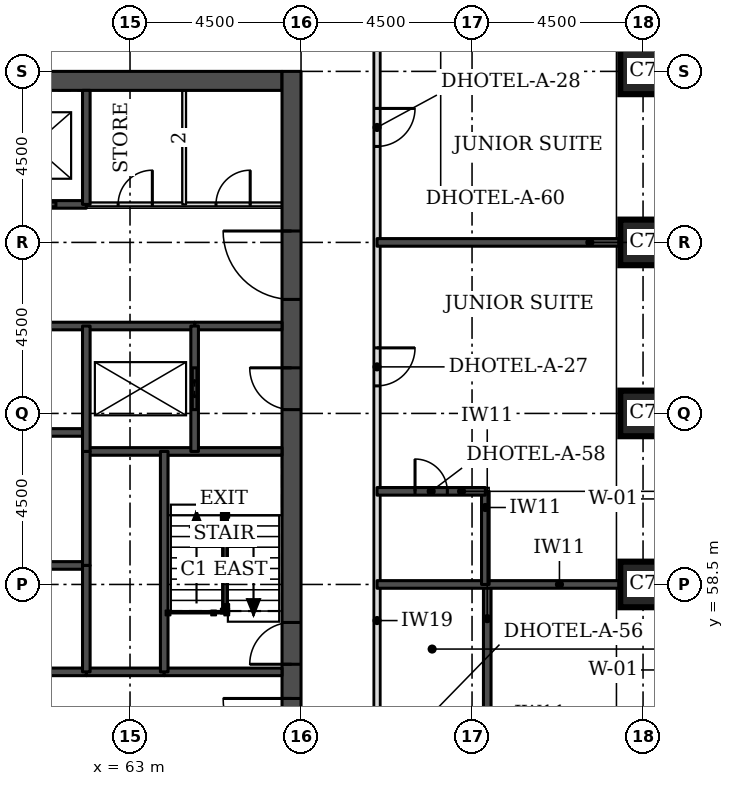
"""IFC4 building model, lengths in metres.
Left out: names, types, materials, properties, quantities, classifications, styles, units other than length and angle.
Written with IfcOpenShell. Run it as: python <this file> out.ifc"""

import sys

from ifc_helpers import new_model, si_unit, direction, frame, frame_2d, origin, origin_2d, place, context, subcontext, project, spatial, rectangle, extrude, element, fill, save


model = new_model("IFC4")
c1 = context("Model", 3, precision=1e-05, world=origin(), true_north=direction((0.0, 1.0)))
c2 = subcontext(c1, "Body", "Model", "MODEL_VIEW")
j1 = project(units=[si_unit("LENGTHUNIT", "METRE"), si_unit("PLANEANGLEUNIT", "RADIAN")], contexts=[c1])
p1 = place(None, origin())
s1 = spatial("IfcSite", under=j1, at=p1, CompositionType="ELEMENT")
p2 = place(p1, origin())
s2 = spatial("IfcBuilding", under=s1, at=p2, CompositionType="ELEMENT")
p3 = place(p2, frame((0.0, 0.0, 49.5)))
s3 = spatial("IfcBuildingStorey", under=s2, at=p3, CompositionType="ELEMENT", Elevation=49.5)
for number, where, z_axis, x_axis in (
    (1, (76.5, 58.5, 0.0), (0.0, 0.0, 1.0), (1.0, 0.0, 0.0)),
    (2, (76.5, 63.0, 0.0), (0.0, 0.0, 1.0), (1.0, 0.0, 0.0)),
    (3, (76.5, 67.5, 0.0), (0.0, 0.0, 1.0), (1.0, 0.0, 0.0)),
    (4, (76.5, 72.0, 0.0), (0.0, 0.0, 1.0), (1.0, 0.0, 0.0)),
):
    element("IfcColumn", number, at=place(p3, frame(where, z_axis=z_axis, x_axis=x_axis)), inside=s3, PredefinedType="COLUMN", context=c2, shape_type="SweptSolid", body=[
        extrude(rectangle(XDim=1.2, YDim=1.2, at=origin_2d()), origin(), (0.0, 0.0, 1.0), 3.3),
    ])
p4 = place(p3, frame((45.5, 71.75, 0.0), z_axis=(0.0, 0.0, 1.0), x_axis=(1.0, 0.0, 0.0)))
e5 = element("IfcWall", 5, at=p4, inside=s3, PredefinedType="SHEAR", context=c2, shape_type="SweptSolid", body=[
    extrude(rectangle(XDim=21.5, YDim=0.5, at=frame_2d((10.75, 0.0))), origin(), (0.0, 0.0, 1.0), 3.3),
])
p5 = place(p3, frame((67.25, 49.5, 0.0), z_axis=(0.0, 0.0, 1.0), x_axis=(0.0, 1.0, 0.0)))
e6 = element("IfcWall", 6, at=p5, inside=s3, PredefinedType="SHEAR", context=c2, shape_type="SweptSolid", body=[
    extrude(rectangle(XDim=22.5, YDim=0.5, at=frame_2d((11.25, 0.0))), origin(), (0.0, 0.0, 1.0), 3.3),
])
p6 = place(p5, frame((4.2, 0.0, 0.0)))
e7 = element("IfcOpeningElement", 7, at=p6, cuts=e6, PredefinedType="OPENING", context=c2, shape_type="SweptSolid", body=[
    extrude(rectangle(XDim=1.8, YDim=2.1, at=frame_2d((0.9, 1.05))), frame((0.0, 0.26, 0.0), z_axis=(0.0, -1.0, 0.0), x_axis=(1.0, 0.0, 0.0)), (0.0, 0.0, 1.0), 0.52),
])
p7 = place(p5, frame((6.9, 0.0, 0.0)))
e8 = element("IfcOpeningElement", 8, at=p7, cuts=e6, PredefinedType="OPENING", context=c2, shape_type="SweptSolid", body=[
    extrude(rectangle(XDim=1.1, YDim=2.1, at=frame_2d((0.55, 1.05))), frame((0.0, 0.26, 0.0), z_axis=(0.0, -1.0, 0.0), x_axis=(1.0, 0.0, 0.0)), (0.0, 0.0, 1.0), 0.52),
])
p8 = place(p5, frame((13.6, 0.0, 0.0)))
e9 = element("IfcOpeningElement", 9, at=p8, cuts=e6, PredefinedType="OPENING", context=c2, shape_type="SweptSolid", body=[
    extrude(rectangle(XDim=1.1, YDim=2.1, at=frame_2d((0.55, 1.05))), frame((0.0, 0.26, 0.0), z_axis=(0.0, -1.0, 0.0), x_axis=(1.0, 0.0, 0.0)), (0.0, 0.0, 1.0), 0.52),
])
p9 = place(p5, frame((16.5, 0.0, 0.0)))
e10 = element("IfcOpeningElement", 10, at=p9, cuts=e6, PredefinedType="OPENING", context=c2, shape_type="SweptSolid", body=[
    extrude(rectangle(XDim=1.8, YDim=2.1, at=frame_2d((0.9, 1.05))), frame((0.0, 0.26, 0.0), z_axis=(0.0, -1.0, 0.0), x_axis=(1.0, 0.0, 0.0)), (0.0, 0.0, 1.0), 0.52),
])
p10 = place(p3, frame((69.5, 47.5, 0.0), z_axis=(0.0, 0.0, 1.0), x_axis=(0.0, 1.0, 0.0)))
e11 = element("IfcWall", 11, at=p10, inside=s3, PredefinedType="PARTITIONING", context=c2, shape_type="SweptSolid", body=[
    extrude(rectangle(XDim=26.5, YDim=0.15, at=frame_2d((13.25, 0.0))), origin(), (0.0, 0.0, 1.0), 3.08),
])
p11 = place(p10, frame((22.525, 0.0, 0.0)))
e12 = element("IfcOpeningElement", 12, at=p11, cuts=e11, PredefinedType="OPENING", context=c2, shape_type="SweptSolid", body=[
    extrude(rectangle(XDim=1.0, YDim=2.1, at=frame_2d((0.5, 1.05))), frame((0.0, 0.085, 0.0), z_axis=(0.0, -1.0, 0.0), x_axis=(1.0, 0.0, 0.0)), (0.0, 0.0, 1.0), 0.17),
])
p12 = place(p10, frame((16.225, 0.0, 0.0)))
e13 = element("IfcOpeningElement", 13, at=p12, cuts=e11, PredefinedType="OPENING", context=c2, shape_type="SweptSolid", body=[
    extrude(rectangle(XDim=1.0, YDim=2.1, at=frame_2d((0.5, 1.05))), frame((0.0, 0.085, 0.0), z_axis=(0.0, -1.0, 0.0), x_axis=(1.0, 0.0, 0.0)), (0.0, 0.0, 1.0), 0.17),
])
p13 = place(p10, frame((4.25, 0.0, 0.0)))
e14 = element("IfcOpeningElement", 14, at=p13, cuts=e11, PredefinedType="OPENING", context=c2, shape_type="SweptSolid", body=[
    extrude(rectangle(XDim=1.1, YDim=2.1, at=frame_2d((0.55, 1.05))), frame((0.0, 0.085, 0.0), z_axis=(0.0, -1.0, 0.0), x_axis=(1.0, 0.0, 0.0)), (0.0, 0.0, 1.0), 0.17),
])
p14 = place(p10, frame((0.447, 0.0, 0.0)))
e15 = element("IfcOpeningElement", 15, at=p14, cuts=e11, PredefinedType="OPENING", context=c2, shape_type="SweptSolid", body=[
    extrude(rectangle(XDim=1.0, YDim=2.1, at=frame_2d((0.5, 1.05))), frame((0.0, 0.085, 0.0), z_axis=(0.0, -1.0, 0.0), x_axis=(1.0, 0.0, 0.0)), (0.0, 0.0, 1.0), 0.17),
])
p15 = place(p3, frame((72.4, 55.1, 0.0), z_axis=(0.0, 0.0, 1.0), x_axis=(0.0, 1.0, 0.0)))
e16 = element("IfcWall", 16, at=p15, inside=s3, PredefinedType="SOLIDWALL", context=c2, shape_type="SweptSolid", body=[
    extrude(rectangle(XDim=3.4, YDim=0.2, at=frame_2d((1.7, 0.0))), origin(), (0.0, 0.0, 1.0), 3.08),
])
p16 = place(p3, frame((69.5, 58.5, 0.0), z_axis=(0.0, 0.0, 1.0), x_axis=(1.0, 0.0, 0.0)))
e17 = element("IfcWall", 17, at=p16, inside=s3, PredefinedType="SOLIDWALL", context=c2, shape_type="SweptSolid", body=[
    extrude(rectangle(XDim=6.4, YDim=0.2, at=frame_2d((3.2, 0.0))), origin(), (0.0, 0.0, 1.0), 3.08),
])
p17 = place(p3, frame((72.35, 58.5, 0.0), z_axis=(0.0, 0.0, 1.0), x_axis=(0.0, 1.0, 0.0)))
e18 = element("IfcWall", 18, at=p17, inside=s3, PredefinedType="SOLIDWALL", context=c2, shape_type="SweptSolid", body=[
    extrude(rectangle(XDim=2.45, YDim=0.2, at=frame_2d((1.225, 0.0))), origin(), (0.0, 0.0, 1.0), 3.08),
])
p18 = place(p3, frame((69.5, 60.95, 0.0), z_axis=(0.0, 0.0, 1.0), x_axis=(1.0, 0.0, 0.0)))
e19 = element("IfcWall", 19, at=p18, inside=s3, PredefinedType="SOLIDWALL", context=c2, shape_type="SweptSolid", body=[
    extrude(rectangle(XDim=2.85, YDim=0.2, at=frame_2d((1.425, 0.0))), origin(), (0.0, 0.0, 1.0), 3.08),
])
p19 = place(p18, frame((1.0, 0.0, 0.0)))
e20 = element("IfcOpeningElement", 20, at=p19, cuts=e19, PredefinedType="OPENING", context=c2, shape_type="SweptSolid", body=[
    extrude(rectangle(XDim=0.85, YDim=2.1, at=frame_2d((0.425, 1.05))), frame((0.0, 0.11, 0.0), z_axis=(0.0, -1.0, 0.0), x_axis=(1.0, 0.0, 0.0)), (0.0, 0.0, 1.0), 0.22),
])
p20 = place(p3, frame((69.5, 67.5, 0.0), z_axis=(0.0, 0.0, 1.0), x_axis=(1.0, 0.0, 0.0)))
e21 = element("IfcWall", 21, at=p20, inside=s3, PredefinedType="SOLIDWALL", context=c2, shape_type="SweptSolid", body=[
    extrude(rectangle(XDim=6.4, YDim=0.2, at=frame_2d((3.2, 0.0))), origin(), (0.0, 0.0, 1.0), 3.08),
])
p21 = place(p3, frame((61.85, 56.2, 0.0), z_axis=(0.0, 0.0, 1.0), x_axis=(1.0, 0.0, 0.0)))
e22 = element("IfcWall", 22, at=p21, inside=s3, PredefinedType="SOLIDWALL", context=c2, shape_type="SweptSolid", body=[
    extrude(rectangle(XDim=2.05, YDim=0.2, at=frame_2d((1.025, 0.0))), origin(), (0.0, 0.0, 1.0), 3.08),
])
p22 = place(p3, frame((50.65, 56.2, 0.0), z_axis=(0.0, 0.0, 1.0), x_axis=(1.0, 0.0, 0.0)))
e23 = element("IfcWall", 23, at=p22, inside=s3, PredefinedType="SOLIDWALL", context=c2, shape_type="SweptSolid", body=[
    extrude(rectangle(XDim=11.2, YDim=0.2, at=frame_2d((5.6, 0.0))), origin(), (0.0, 0.0, 1.0), 3.08),
])
p23 = place(p3, frame((63.9, 56.2, 0.0), z_axis=(0.0, 0.0, 1.0), x_axis=(1.0, 0.0, 0.0)))
e24 = element("IfcWall", 24, at=p23, inside=s3, PredefinedType="SOLIDWALL", context=c2, shape_type="SweptSolid", body=[
    extrude(rectangle(XDim=3.1, YDim=0.2, at=frame_2d((1.55, 0.0))), origin(), (0.0, 0.0, 1.0), 3.08),
])
p24 = place(p3, frame((50.65, 59.0, 0.0), z_axis=(0.0, 0.0, 1.0), x_axis=(1.0, 0.0, 0.0)))
e25 = element("IfcWall", 25, at=p24, inside=s3, PredefinedType="SOLIDWALL", context=c2, shape_type="SweptSolid", body=[
    extrude(rectangle(XDim=11.2, YDim=0.2, at=frame_2d((5.6, 0.0))), origin(), (0.0, 0.0, 1.0), 3.3),
])
p25 = place(p3, frame((61.85, 62.0, 0.0), z_axis=(0.0, 0.0, 1.0), x_axis=(1.0, 0.0, 0.0)))
e26 = element("IfcWall", 26, at=p25, inside=s3, PredefinedType="SOLIDWALL", context=c2, shape_type="SweptSolid", body=[
    extrude(rectangle(XDim=5.15, YDim=0.2, at=frame_2d((2.575, 0.0))), origin(), (0.0, 0.0, 1.0), 3.08),
])
p26 = place(p3, frame((50.65, 62.5, 0.0), z_axis=(0.0, 0.0, 1.0), x_axis=(1.0, 0.0, 0.0)))
e27 = element("IfcWall", 27, at=p26, inside=s3, PredefinedType="SOLIDWALL", context=c2, shape_type="SweptSolid", body=[
    extrude(rectangle(XDim=11.2, YDim=0.2, at=frame_2d((5.6, 0.0))), origin(), (0.0, 0.0, 1.0), 3.3),
])
p27 = place(p3, frame((64.7, 65.3, 0.0), z_axis=(0.0, 0.0, 1.0), x_axis=(1.0, 0.0, 0.0)))
e28 = element("IfcWall", 28, at=p27, inside=s3, PredefinedType="SOLIDWALL", context=c2, shape_type="SweptSolid", body=[
    extrude(rectangle(XDim=2.3, YDim=0.2, at=frame_2d((1.15, 0.0))), origin(), (0.0, 0.0, 1.0), 3.08),
])
p28 = place(p3, frame((47.8, 65.3, 0.0), z_axis=(0.0, 0.0, 1.0), x_axis=(1.0, 0.0, 0.0)))
e29 = element("IfcWall", 29, at=p28, inside=s3, PredefinedType="SOLIDWALL", context=c2, shape_type="SweptSolid", body=[
    extrude(rectangle(XDim=16.9, YDim=0.2, at=frame_2d((8.45, 0.0))), origin(), (0.0, 0.0, 1.0), 3.08),
])
p29 = place(p3, frame((61.85, 68.5, 0.0), z_axis=(0.0, 0.0, 1.0), x_axis=(1.0, 0.0, 0.0)))
e30 = element("IfcWall", 30, at=p29, inside=s3, PredefinedType="PARTITIONING", context=c2, shape_type="SweptSolid", body=[
    extrude(rectangle(XDim=5.15, YDim=0.1, at=frame_2d((2.575, 0.0))), origin(), (0.0, 0.0, 1.0), 3.08),
])
p30 = place(p29, frame((3.413, 0.0, 0.0)))
e31 = element("IfcOpeningElement", 31, at=p30, cuts=e30, PredefinedType="OPENING", context=c2, shape_type="SweptSolid", body=[
    extrude(rectangle(XDim=0.9, YDim=2.1, at=frame_2d((0.45, 1.05))), frame((0.0, 0.06, 0.0), z_axis=(0.0, -1.0, 0.0), x_axis=(1.0, 0.0, 0.0)), (0.0, 0.0, 1.0), 0.12),
])
p31 = place(p29, frame((0.837, 0.0, 0.0)))
e32 = element("IfcOpeningElement", 32, at=p31, cuts=e30, PredefinedType="OPENING", context=c2, shape_type="SweptSolid", body=[
    extrude(rectangle(XDim=0.9, YDim=2.1, at=frame_2d((0.45, 1.05))), frame((0.0, 0.06, 0.0), z_axis=(0.0, -1.0, 0.0), x_axis=(1.0, 0.0, 0.0)), (0.0, 0.0, 1.0), 0.12),
])
p32 = place(p3, frame((50.65, 68.5, 0.0), z_axis=(0.0, 0.0, 1.0), x_axis=(1.0, 0.0, 0.0)))
e33 = element("IfcWall", 33, at=p32, inside=s3, PredefinedType="SOLIDWALL", context=c2, shape_type="SweptSolid", body=[
    extrude(rectangle(XDim=11.2, YDim=0.2, at=frame_2d((5.6, 0.0))), origin(), (0.0, 0.0, 1.0), 3.08),
])
p33 = place(p32, frame((0.8, 0.0, 0.0)))
e34 = element("IfcOpeningElement", 34, at=p33, cuts=e33, PredefinedType="OPENING", context=c2, shape_type="SweptSolid", body=[
    extrude(rectangle(XDim=1.2, YDim=2.1, at=frame_2d((0.6, 1.05))), frame((0.0, 0.11, 0.0), z_axis=(0.0, -1.0, 0.0), x_axis=(1.0, 0.0, 0.0)), (0.0, 0.0, 1.0), 0.22),
])
p34 = place(p32, frame((3.6, 0.0, 0.0)))
e35 = element("IfcOpeningElement", 35, at=p34, cuts=e33, PredefinedType="OPENING", context=c2, shape_type="SweptSolid", body=[
    extrude(rectangle(XDim=1.2, YDim=2.1, at=frame_2d((0.6, 1.05))), frame((0.0, 0.11, 0.0), z_axis=(0.0, -1.0, 0.0), x_axis=(1.0, 0.0, 0.0)), (0.0, 0.0, 1.0), 0.22),
])
p35 = place(p32, frame((6.4, 0.0, 0.0)))
e36 = element("IfcOpeningElement", 36, at=p35, cuts=e33, PredefinedType="OPENING", context=c2, shape_type="SweptSolid", body=[
    extrude(rectangle(XDim=1.2, YDim=2.1, at=frame_2d((0.6, 1.05))), frame((0.0, 0.11, 0.0), z_axis=(0.0, -1.0, 0.0), x_axis=(1.0, 0.0, 0.0)), (0.0, 0.0, 1.0), 0.22),
])
p36 = place(p32, frame((9.2, 0.0, 0.0)))
e37 = element("IfcOpeningElement", 37, at=p36, cuts=e33, PredefinedType="OPENING", context=c2, shape_type="SweptSolid", body=[
    extrude(rectangle(XDim=1.2, YDim=2.1, at=frame_2d((0.6, 1.05))), frame((0.0, 0.11, 0.0), z_axis=(0.0, -1.0, 0.0), x_axis=(1.0, 0.0, 0.0)), (0.0, 0.0, 1.0), 0.22),
])
p37 = place(p3, frame((61.85, 59.0, 0.0), z_axis=(0.0, 0.0, 1.0), x_axis=(0.0, 1.0, 0.0)))
e38 = element("IfcWall", 38, at=p37, inside=s3, PredefinedType="SOLIDWALL", context=c2, shape_type="SweptSolid", body=[
    extrude(rectangle(XDim=3.0, YDim=0.2, at=frame_2d((1.5, 0.0))), origin(), (0.0, 0.0, 1.0), 3.3),
])
p38 = place(p3, frame((61.85, 56.2, 0.0), z_axis=(0.0, 0.0, 1.0), x_axis=(0.0, 1.0, 0.0)))
e39 = element("IfcWall", 39, at=p38, inside=s3, PredefinedType="SOLIDWALL", context=c2, shape_type="SweptSolid", body=[
    extrude(rectangle(XDim=2.8, YDim=0.2, at=frame_2d((1.4, 0.0))), origin(), (0.0, 0.0, 1.0), 3.08),
])
p39 = place(p3, frame((61.85, 62.0, 0.0), z_axis=(0.0, 0.0, 1.0), x_axis=(0.0, 1.0, 0.0)))
e40 = element("IfcWall", 40, at=p39, inside=s3, PredefinedType="SOLIDWALL", context=c2, shape_type="SweptSolid", body=[
    extrude(rectangle(XDim=3.3, YDim=0.2, at=frame_2d((1.65, 0.0))), origin(), (0.0, 0.0, 1.0), 3.08),
])
p40 = place(p3, frame((61.85, 68.5, 0.0), z_axis=(0.0, 0.0, 1.0), x_axis=(0.0, 1.0, 0.0)))
e41 = element("IfcWall", 41, at=p40, inside=s3, PredefinedType="SOLIDWALL", context=c2, shape_type="SweptSolid", body=[
    extrude(rectangle(XDim=3.0, YDim=0.2, at=frame_2d((1.5, 0.0))), origin(), (0.0, 0.0, 1.0), 3.08),
])
p41 = place(p3, frame((63.9, 56.2, 0.0), z_axis=(0.0, 0.0, 1.0), x_axis=(0.0, 1.0, 0.0)))
e42 = element("IfcWall", 42, at=p41, inside=s3, PredefinedType="SOLIDWALL", context=c2, shape_type="SweptSolid", body=[
    extrude(rectangle(XDim=5.8, YDim=0.2, at=frame_2d((2.9, 0.0))), origin(), (0.0, 0.0, 1.0), 3.08),
])
p42 = place(p3, frame((64.425, 68.5, 0.0), z_axis=(0.0, 0.0, 1.0), x_axis=(0.0, 1.0, 0.0)))
e43 = element("IfcWall", 43, at=p42, inside=s3, PredefinedType="PARTITIONING", context=c2, shape_type="SweptSolid", body=[
    extrude(rectangle(XDim=3.0, YDim=0.1, at=frame_2d((1.5, 0.0))), origin(), (0.0, 0.0, 1.0), 3.08),
])
p43 = place(p3, frame((64.7, 62.0, 0.0), z_axis=(0.0, 0.0, 1.0), x_axis=(0.0, 1.0, 0.0)))
e44 = element("IfcWall", 44, at=p43, inside=s3, PredefinedType="SOLIDWALL", context=c2, shape_type="SweptSolid", body=[
    extrude(rectangle(XDim=3.3, YDim=0.2, at=frame_2d((1.65, 0.0))), origin(), (0.0, 0.0, 1.0), 3.08),
])
p44 = place(p43, frame((1.1, 0.0, 0.0)))
e45 = element("IfcOpeningElement", 45, at=p44, cuts=e44, PredefinedType="OPENING", context=c2, shape_type="SweptSolid", body=[
    extrude(rectangle(XDim=1.1, YDim=2.1, at=frame_2d((0.55, 1.05))), frame((0.0, 0.11, 0.0), z_axis=(0.0, -1.0, 0.0), x_axis=(1.0, 0.0, 0.0)), (0.0, 0.0, 1.0), 0.22),
])
p45 = place(p11, frame((1.0, 0.0, 0.0), z_axis=(0.0, 0.0, 1.0), x_axis=(-1.0, 0.0, 0.0)))
e46 = element("IfcDoor", 46, at=p45, inside=s3, OperationType="SINGLE_SWING_LEFT", PredefinedType="DOOR", context=c2, shape_type="SweptSolid", body=[
    extrude(rectangle(XDim=1.0, YDim=2.1, at=frame_2d((0.5, 1.05))), frame((0.0, 0.025, 0.0), z_axis=(0.0, -1.0, 0.0), x_axis=(1.0, 0.0, 0.0)), (0.0, 0.0, 1.0), 0.05),
])
fill(e12, e46)
p46 = place(p12, frame((1.0, 0.0, 0.0), z_axis=(0.0, 0.0, 1.0), x_axis=(-1.0, 0.0, 0.0)))
e47 = element("IfcDoor", 47, at=p46, inside=s3, OperationType="SINGLE_SWING_LEFT", PredefinedType="DOOR", context=c2, shape_type="SweptSolid", body=[
    extrude(rectangle(XDim=1.0, YDim=2.1, at=frame_2d((0.5, 1.05))), frame((0.0, 0.025, 0.0), z_axis=(0.0, -1.0, 0.0), x_axis=(1.0, 0.0, 0.0)), (0.0, 0.0, 1.0), 0.05),
])
fill(e13, e47)
p47 = place(p19, origin())
e48 = element("IfcDoor", 48, at=p47, inside=s3, OperationType="SINGLE_SWING_LEFT", PredefinedType="DOOR", context=c2, shape_type="SweptSolid", body=[
    extrude(rectangle(XDim=0.85, YDim=2.1, at=frame_2d((0.425, 1.05))), frame((0.0, 0.025, 0.0), z_axis=(0.0, -1.0, 0.0), x_axis=(1.0, 0.0, 0.0)), (0.0, 0.0, 1.0), 0.05),
])
fill(e20, e48)
p48 = place(p36, origin())
e49 = element("IfcDoor", 49, at=p48, inside=s3, OperationType="DOUBLE_DOOR_SLIDING", PredefinedType="DOOR", context=c2, shape_type="SweptSolid", body=[
    extrude(rectangle(XDim=1.2, YDim=2.1, at=frame_2d((0.6, 1.05))), frame((0.0, 0.025, 0.0), z_axis=(0.0, -1.0, 0.0), x_axis=(1.0, 0.0, 0.0)), (0.0, 0.0, 1.0), 0.05),
])
fill(e37, e49)
p49 = place(p44, origin())
e50 = element("IfcDoor", 50, at=p49, inside=s3, OperationType="DOUBLE_DOOR_SLIDING", PredefinedType="DOOR", context=c2, shape_type="SweptSolid", body=[
    extrude(rectangle(XDim=1.1, YDim=2.1, at=frame_2d((0.55, 1.05))), frame((0.0, 0.025, 0.0), z_axis=(0.0, -1.0, 0.0), x_axis=(1.0, 0.0, 0.0)), (0.0, 0.0, 1.0), 0.05),
])
fill(e45, e50)
p50 = place(p6, origin())
e51 = element("IfcDoor", 51, at=p50, inside=s3, OperationType="SINGLE_SWING_RIGHT", PredefinedType="DOOR", context=c2, shape_type="SweptSolid", body=[
    extrude(rectangle(XDim=1.8, YDim=2.1, at=frame_2d((0.9, 1.05))), frame((0.0, 0.025, 0.0), z_axis=(0.0, -1.0, 0.0), x_axis=(1.0, 0.0, 0.0)), (0.0, 0.0, 1.0), 0.05),
])
fill(e7, e51)
p51 = place(p7, origin())
e52 = element("IfcDoor", 52, at=p51, inside=s3, OperationType="SINGLE_SWING_LEFT", PredefinedType="DOOR", context=c2, shape_type="SweptSolid", body=[
    extrude(rectangle(XDim=1.1, YDim=2.1, at=frame_2d((0.55, 1.05))), frame((0.0, 0.025, 0.0), z_axis=(0.0, -1.0, 0.0), x_axis=(1.0, 0.0, 0.0)), (0.0, 0.0, 1.0), 0.05),
])
fill(e8, e52)
p52 = place(p8, origin())
e53 = element("IfcDoor", 53, at=p52, inside=s3, OperationType="SINGLE_SWING_RIGHT", PredefinedType="DOOR", context=c2, shape_type="SweptSolid", body=[
    extrude(rectangle(XDim=1.1, YDim=2.1, at=frame_2d((0.55, 1.05))), frame((0.0, 0.025, 0.0), z_axis=(0.0, -1.0, 0.0), x_axis=(1.0, 0.0, 0.0)), (0.0, 0.0, 1.0), 0.05),
])
fill(e9, e53)
p53 = place(p9, origin())
e54 = element("IfcDoor", 54, at=p53, inside=s3, OperationType="SINGLE_SWING_RIGHT", PredefinedType="DOOR", context=c2, shape_type="SweptSolid", body=[
    extrude(rectangle(XDim=1.8, YDim=2.1, at=frame_2d((0.9, 1.05))), frame((0.0, 0.025, 0.0), z_axis=(0.0, -1.0, 0.0), x_axis=(1.0, 0.0, 0.0)), (0.0, 0.0, 1.0), 0.05),
])
fill(e10, e54)
p54 = place(p30, origin())
e55 = element("IfcDoor", 55, at=p54, inside=s3, OperationType="SINGLE_SWING_RIGHT", PredefinedType="DOOR", context=c2, shape_type="SweptSolid", body=[
    extrude(rectangle(XDim=0.9, YDim=2.1, at=frame_2d((0.45, 1.05))), frame((0.0, 0.025, 0.0), z_axis=(0.0, -1.0, 0.0), x_axis=(1.0, 0.0, 0.0)), (0.0, 0.0, 1.0), 0.05),
])
fill(e31, e55)
p55 = place(p31, origin())
e56 = element("IfcDoor", 56, at=p55, inside=s3, OperationType="SINGLE_SWING_RIGHT", PredefinedType="DOOR", context=c2, shape_type="SweptSolid", body=[
    extrude(rectangle(XDim=0.9, YDim=2.1, at=frame_2d((0.45, 1.05))), frame((0.0, 0.025, 0.0), z_axis=(0.0, -1.0, 0.0), x_axis=(1.0, 0.0, 0.0)), (0.0, 0.0, 1.0), 0.05),
])
fill(e32, e56)
save(model, sys.argv[1])
